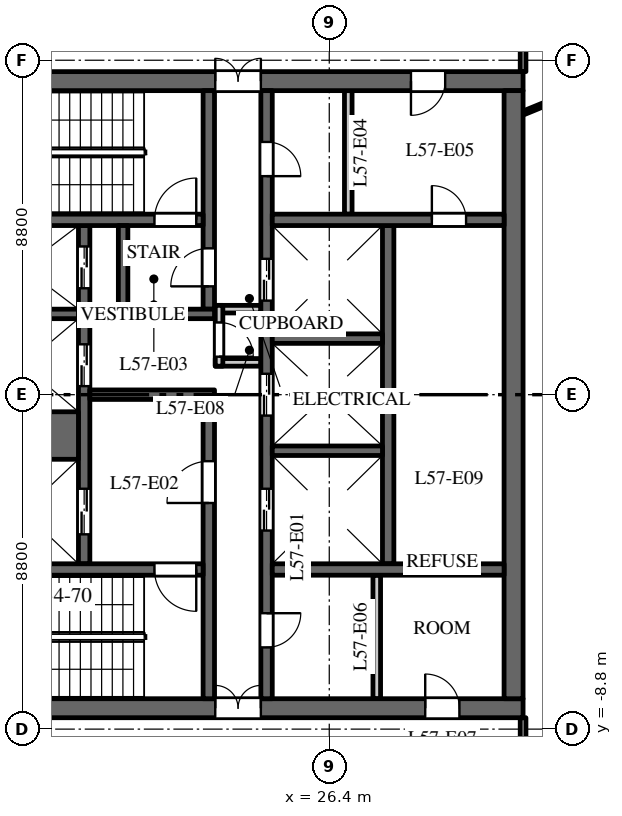
"""IFC4 building model, lengths in metres.
Left out: names, types, materials, properties, quantities, classifications, styles, units other than length and angle.
Written with IfcOpenShell. Run it as: python <this file> out.ifc"""

import sys

from ifc_helpers import new_model, si_unit, direction, frame, frame_2d, origin, place, context, subcontext, project, spatial, rectangle, extrude, element, fill, save


model = new_model("IFC4")
c1 = context("Model", 3, precision=1e-05, world=origin(), true_north=direction((0.0, 1.0)))
c2 = subcontext(c1, "Body", "Model", "MODEL_VIEW")
j1 = project(units=[si_unit("LENGTHUNIT", "METRE"), si_unit("PLANEANGLEUNIT", "RADIAN")], contexts=[c1])
p1 = place(None, origin())
s1 = spatial("IfcSite", under=j1, at=p1, CompositionType="ELEMENT")
p2 = place(p1, origin())
s2 = spatial("IfcBuilding", under=s1, at=p2, CompositionType="ELEMENT")
p3 = place(p2, frame((0.0, 0.0, 269.5)))
s3 = spatial("IfcBuildingStorey", under=s2, at=p3, CompositionType="ELEMENT", Elevation=269.5)
p4 = place(p3, frame((16.5, 8.25, 0.0), z_axis=(0.0, 0.0, 1.0), x_axis=(1.0, 0.0, 0.0)))
e1 = element("IfcWall", 1, at=p4, inside=s3, PredefinedType="SHEAR", context=c2, shape_type="SweptSolid", body=[
    extrude(rectangle(XDim=15.0, YDim=0.5, at=frame_2d((7.5, 0.0))), origin(), (0.0, 0.0, 1.0), 3.7),
])
p5 = place(p4, frame((6.9, 0.0, 0.0)))
e2 = element("IfcOpeningElement", 2, at=p5, cuts=e1, PredefinedType="OPENING", context=c2, shape_type="SweptSolid", body=[
    extrude(rectangle(XDim=1.2, YDim=2.1, at=frame_2d((0.6, 1.05))), frame((0.0, 0.26, 0.0), z_axis=(0.0, -1.0, 0.0), x_axis=(1.0, 0.0, 0.0)), (0.0, 0.0, 1.0), 0.52),
])
p6 = place(p4, frame((12.05, 0.0, 0.0)))
e3 = element("IfcOpeningElement", 3, at=p6, cuts=e1, PredefinedType="OPENING", context=c2, shape_type="SweptSolid", body=[
    extrude(rectangle(XDim=0.9, YDim=2.1, at=frame_2d((0.45, 1.05))), frame((0.0, 0.26, 0.0), z_axis=(0.0, -1.0, 0.0), x_axis=(1.0, 0.0, 0.0)), (0.0, 0.0, 1.0), 0.52),
])
p7 = place(p3, frame((16.5, -8.25, 0.0), z_axis=(0.0, 0.0, 1.0), x_axis=(1.0, 0.0, 0.0)))
e4 = element("IfcWall", 4, at=p7, inside=s3, PredefinedType="SHEAR", context=c2, shape_type="SweptSolid", body=[
    extrude(rectangle(XDim=15.0, YDim=0.5, at=frame_2d((7.5, 0.0))), origin(), (0.0, 0.0, 1.0), 3.7),
])
p8 = place(p7, frame((6.9, 0.0, 0.0)))
e5 = element("IfcOpeningElement", 5, at=p8, cuts=e4, PredefinedType="OPENING", context=c2, shape_type="SweptSolid", body=[
    extrude(rectangle(XDim=1.2, YDim=2.1, at=frame_2d((0.6, 1.05))), frame((0.0, 0.26, 0.0), z_axis=(0.0, -1.0, 0.0), x_axis=(1.0, 0.0, 0.0)), (0.0, 0.0, 1.0), 0.52),
])
p9 = place(p7, frame((12.425, 0.0, 0.0)))
e6 = element("IfcOpeningElement", 6, at=p9, cuts=e4, PredefinedType="OPENING", context=c2, shape_type="SweptSolid", body=[
    extrude(rectangle(XDim=0.9, YDim=2.1, at=frame_2d((0.45, 1.05))), frame((0.0, 0.26, 0.0), z_axis=(0.0, -1.0, 0.0), x_axis=(1.0, 0.0, 0.0)), (0.0, 0.0, 1.0), 0.52),
])
p10 = place(p3, frame((27.95, -4.45, 0.0), z_axis=(0.0, 0.0, 1.0), x_axis=(0.0, 1.0, 0.0)))
e7 = element("IfcWall", 7, at=p10, inside=s3, PredefinedType="SHEAR", context=c2, shape_type="SweptSolid", body=[
    extrude(rectangle(XDim=8.9, YDim=0.3, at=frame_2d((4.45, 0.0))), origin(), (0.0, 0.0, 1.0), 3.7),
])
p11 = place(p3, frame((19.95, -4.45, 0.0), z_axis=(0.0, 0.0, 1.0), x_axis=(0.0, 1.0, 0.0)))
e8 = element("IfcWall", 8, at=p11, inside=s3, PredefinedType="SHEAR", context=c2, shape_type="SweptSolid", body=[
    extrude(rectangle(XDim=8.9, YDim=0.3, at=frame_2d((4.45, 0.0))), origin(), (0.0, 0.0, 1.0), 3.7),
])
p12 = place(p11, frame((0.775, 0.0, 0.0)))
e9 = element("IfcOpeningElement", 9, at=p12, cuts=e8, PredefinedType="OPENING", context=c2, shape_type="SweptSolid", body=[
    extrude(rectangle(XDim=1.2, YDim=2.1, at=frame_2d((0.6, 1.05))), frame((0.0, 0.16, 0.0), z_axis=(0.0, -1.0, 0.0), x_axis=(1.0, 0.0, 0.0)), (0.0, 0.0, 1.0), 0.32),
])
p13 = place(p11, frame((4.675, 0.0, 0.0)))
e10 = element("IfcOpeningElement", 10, at=p13, cuts=e8, PredefinedType="OPENING", context=c2, shape_type="SweptSolid", body=[
    extrude(rectangle(XDim=1.1, YDim=2.1, at=frame_2d((0.55, 1.05))), frame((0.0, 0.16, 0.0), z_axis=(0.0, -1.0, 0.0), x_axis=(1.0, 0.0, 0.0)), (0.0, 0.0, 1.0), 0.32),
])
p14 = place(p11, frame((7.25, 0.0, 0.0)))
e11 = element("IfcOpeningElement", 11, at=p14, cuts=e8, PredefinedType="OPENING", context=c2, shape_type="SweptSolid", body=[
    extrude(rectangle(XDim=1.1, YDim=2.1, at=frame_2d((0.55, 1.05))), frame((0.0, 0.16, 0.0), z_axis=(0.0, -1.0, 0.0), x_axis=(1.0, 0.0, 0.0)), (0.0, 0.0, 1.0), 0.32),
])
p15 = place(p3, frame((24.75, -8.0, 0.0), z_axis=(0.0, 0.0, 1.0), x_axis=(0.0, 1.0, 0.0)))
e12 = element("IfcWall", 12, at=p15, inside=s3, PredefinedType="SHEAR", context=c2, shape_type="SweptSolid", body=[
    extrude(rectangle(XDim=16.0, YDim=0.3, at=frame_2d((8.0, 0.0))), origin(), (0.0, 0.0, 1.0), 3.7),
])
p16 = place(p15, frame((4.425, 0.0, 0.0)))
e13 = element("IfcOpeningElement", 13, at=p16, cuts=e12, PredefinedType="OPENING", context=c2, shape_type="SweptSolid", body=[
    extrude(rectangle(XDim=1.1, YDim=2.1, at=frame_2d((0.55, 1.05))), frame((0.0, 0.16, 0.0), z_axis=(0.0, -1.0, 0.0), x_axis=(1.0, 0.0, 0.0)), (0.0, 0.0, 1.0), 0.32),
])
p17 = place(p15, frame((7.45, 0.0, 0.0)))
e14 = element("IfcOpeningElement", 14, at=p17, cuts=e12, PredefinedType="OPENING", context=c2, shape_type="SweptSolid", body=[
    extrude(rectangle(XDim=1.1, YDim=2.1, at=frame_2d((0.55, 1.05))), frame((0.0, 0.16, 0.0), z_axis=(0.0, -1.0, 0.0), x_axis=(1.0, 0.0, 0.0)), (0.0, 0.0, 1.0), 0.32),
])
p18 = place(p15, frame((10.475, 0.0, 0.0)))
e15 = element("IfcOpeningElement", 15, at=p18, cuts=e12, PredefinedType="OPENING", context=c2, shape_type="SweptSolid", body=[
    extrude(rectangle(XDim=1.1, YDim=2.1, at=frame_2d((0.55, 1.05))), frame((0.0, 0.16, 0.0), z_axis=(0.0, -1.0, 0.0), x_axis=(1.0, 0.0, 0.0)), (0.0, 0.0, 1.0), 0.32),
])
p19 = place(p15, frame((13.75, 0.0, 0.0)))
e16 = element("IfcOpeningElement", 16, at=p19, cuts=e12, PredefinedType="OPENING", context=c2, shape_type="SweptSolid", body=[
    extrude(rectangle(XDim=0.9, YDim=2.1, at=frame_2d((0.45, 1.05))), frame((0.0, 0.16, 0.0), z_axis=(0.0, -1.0, 0.0), x_axis=(1.0, 0.0, 0.0)), (0.0, 0.0, 1.0), 0.32),
])
p20 = place(p15, frame((1.35, 0.0, 0.0)))
e17 = element("IfcOpeningElement", 17, at=p20, cuts=e12, PredefinedType="OPENING", context=c2, shape_type="SweptSolid", body=[
    extrude(rectangle(XDim=0.9, YDim=2.1, at=frame_2d((0.45, 1.05))), frame((0.0, 0.16, 0.0), z_axis=(0.0, -1.0, 0.0), x_axis=(1.0, 0.0, 0.0)), (0.0, 0.0, 1.0), 0.32),
])
p21 = place(p3, frame((20.1, 0.0, 0.0), z_axis=(0.0, 0.0, 1.0), x_axis=(1.0, 0.0, 0.0)))
e18 = element("IfcWall", 18, at=p21, inside=s3, PredefinedType="SHEAR", context=c2, shape_type="SweptSolid", body=[
    extrude(rectangle(XDim=3.28, YDim=0.25, at=frame_2d((1.64, 0.0))), origin(), (0.0, 0.0, 1.0), 3.7),
])
for number, where, z_axis, x_axis in (
    (19, (23.4, 0.85, 0.0), (0.0, 0.0, 1.0), (1.0, 0.0, 0.0)),
    (20, (23.4, 2.25, 0.0), (0.0, 0.0, 1.0), (1.0, 0.0, 0.0)),
):
    element("IfcWall", number, at=place(p3, frame(where, z_axis=z_axis, x_axis=x_axis)), inside=s3, PredefinedType="PARTITIONING", context=c2, shape_type="SweptSolid", body=[
        extrude(rectangle(XDim=1.2, YDim=0.2, at=frame_2d((0.6, 0.0))), origin(), (0.0, 0.0, 1.0), 3.7),
    ])
p22 = place(p3, frame((23.5, 0.75, 0.0), z_axis=(0.0, 0.0, 1.0), x_axis=(0.0, 1.0, 0.0)))
e21 = element("IfcWall", 21, at=p22, inside=s3, PredefinedType="PARTITIONING", context=c2, shape_type="SweptSolid", body=[
    extrude(rectangle(XDim=1.6, YDim=0.2, at=frame_2d((0.8, 0.0))), origin(), (0.0, 0.0, 1.0), 3.7),
])
p23 = place(p22, frame((0.25, 0.0, 0.0)))
e22 = element("IfcOpeningElement", 22, at=p23, cuts=e21, PredefinedType="OPENING", context=c2, shape_type="SweptSolid", body=[
    extrude(rectangle(XDim=0.9, YDim=2.1, at=frame_2d((0.45, 1.05))), frame((0.0, 0.11, 0.0), z_axis=(0.0, -1.0, 0.0), x_axis=(1.0, 0.0, 0.0)), (0.0, 0.0, 1.0), 0.22),
])
p24 = place(p3, frame((31.25, -8.0, 0.0), z_axis=(0.0, 0.0, 1.0), x_axis=(0.0, 1.0, 0.0)))
e23 = element("IfcWall", 23, at=p24, inside=s3, PredefinedType="SHEAR", context=c2, shape_type="SweptSolid", body=[
    extrude(rectangle(XDim=16.0, YDim=0.5, at=frame_2d((8.0, 0.0))), origin(), (0.0, 0.0, 1.0), 3.7),
])
p25 = place(p3, frame((24.9, 4.6, 0.0), z_axis=(0.0, 0.0, 1.0), x_axis=(1.0, 0.0, 0.0)))
e24 = element("IfcWall", 24, at=p25, inside=s3, PredefinedType="SHEAR", context=c2, shape_type="SweptSolid", body=[
    extrude(rectangle(XDim=6.1, YDim=0.3, at=frame_2d((3.05, 0.0))), origin(), (0.0, 0.0, 1.0), 3.7),
])
p26 = place(p25, frame((4.2, 0.0, 0.0)))
e25 = element("IfcOpeningElement", 25, at=p26, cuts=e24, PredefinedType="OPENING", context=c2, shape_type="SweptSolid", body=[
    extrude(rectangle(XDim=0.9, YDim=2.1, at=frame_2d((0.45, 1.05))), frame((0.0, 0.16, 0.0), z_axis=(0.0, -1.0, 0.0), x_axis=(1.0, 0.0, 0.0)), (0.0, 0.0, 1.0), 0.32),
])
for number, where, z_axis, x_axis in (
    (26, (26.9, 4.75, 0.0), (0.0, 0.0, 1.0), (0.0, 1.0, 0.0)),
    (27, (27.65, -8.0, 0.0), (0.0, 0.0, 1.0), (0.0, 1.0, 0.0)),
):
    element("IfcWall", number, at=place(p3, frame(where, z_axis=z_axis, x_axis=x_axis)), inside=s3, PredefinedType="PARTITIONING", context=c2, shape_type="SweptSolid", body=[
        extrude(rectangle(XDim=3.25, YDim=0.2, at=frame_2d((1.625, 0.0))), origin(), (0.0, 0.0, 1.0), 3.7),
    ])
p27 = place(p3, frame((24.9, -4.6, 0.0), z_axis=(0.0, 0.0, 1.0), x_axis=(1.0, 0.0, 0.0)))
e28 = element("IfcWall", 28, at=p27, inside=s3, PredefinedType="SHEAR", context=c2, shape_type="SweptSolid", body=[
    extrude(rectangle(XDim=6.1, YDim=0.3, at=frame_2d((3.05, 0.0))), origin(), (0.0, 0.0, 1.0), 3.7),
])
p28 = place(p3, frame((16.9, -1.075, 0.0), z_axis=(0.0, 0.0, 1.0), x_axis=(1.0, 0.0, 0.0)))
e29 = element("IfcWall", 29, at=p28, inside=s3, PredefinedType="SHEAR", context=c2, shape_type="SweptSolid", body=[
    extrude(rectangle(XDim=2.9, YDim=1.25, at=frame_2d((1.45, 0.0))), origin(), (0.0, 0.0, 1.0), 3.7),
])
for number, where, z_axis, x_axis in (
    (30, (16.9, 2.125, 0.0), (0.0, 0.0, 1.0), (1.0, 0.0, 0.0)),
    (31, (24.9, -1.475, 0.0), (0.0, 0.0, 1.0), (1.0, 0.0, 0.0)),
    (32, (24.9, 1.475, 0.0), (0.0, 0.0, 1.0), (1.0, 0.0, 0.0)),
):
    element("IfcWall", number, at=place(p3, frame(where, z_axis=z_axis, x_axis=x_axis)), inside=s3, PredefinedType="SHEAR", context=c2, shape_type="SweptSolid", body=[
        extrude(rectangle(XDim=2.9, YDim=0.25, at=frame_2d((1.45, 0.0))), origin(), (0.0, 0.0, 1.0), 3.7),
    ])
p29 = place(p3, frame((23.23, 2.25, 0.0), z_axis=(0.0, 0.0, 1.0), x_axis=(0.0, 1.0, 0.0)))
e33 = element("IfcWall", 33, at=p29, inside=s3, PredefinedType="SHEAR", context=c2, shape_type="SweptSolid", body=[
    extrude(rectangle(XDim=5.75, YDim=0.3, at=frame_2d((2.875, 0.0))), origin(), (0.0, 0.0, 1.0), 3.7),
])
p30 = place(p29, frame((0.6, 0.0, 0.0)))
e34 = element("IfcOpeningElement", 34, at=p30, cuts=e33, PredefinedType="OPENING", context=c2, shape_type="SweptSolid", body=[
    extrude(rectangle(XDim=1.0, YDim=2.1, at=frame_2d((0.5, 1.05))), frame((0.0, 0.16, 0.0), z_axis=(0.0, -1.0, 0.0), x_axis=(1.0, 0.0, 0.0)), (0.0, 0.0, 1.0), 0.32),
])
p31 = place(p3, frame((23.23, -8.0, 0.0), z_axis=(0.0, 0.0, 1.0), x_axis=(0.0, 1.0, 0.0)))
e35 = element("IfcWall", 35, at=p31, inside=s3, PredefinedType="SHEAR", context=c2, shape_type="SweptSolid", body=[
    extrude(rectangle(XDim=7.875, YDim=0.3, at=frame_2d((3.938, 0.0))), origin(), (0.0, 0.0, 1.0), 3.7),
])
p32 = place(p31, frame((5.15, 0.0, 0.0)))
e36 = element("IfcOpeningElement", 36, at=p32, cuts=e35, PredefinedType="OPENING", context=c2, shape_type="SweptSolid", body=[
    extrude(rectangle(XDim=1.1, YDim=2.1, at=frame_2d((0.55, 1.05))), frame((0.0, 0.16, 0.0), z_axis=(0.0, -1.0, 0.0), x_axis=(1.0, 0.0, 0.0)), (0.0, 0.0, 1.0), 0.32),
])
p33 = place(p3, frame((16.9, 4.6, 0.0), z_axis=(0.0, 0.0, 1.0), x_axis=(1.0, 0.0, 0.0)))
e37 = element("IfcWall", 37, at=p33, inside=s3, PredefinedType="SHEAR", context=c2, shape_type="SweptSolid", body=[
    extrude(rectangle(XDim=6.18, YDim=0.3, at=frame_2d((3.09, 0.0))), origin(), (0.0, 0.0, 1.0), 3.7),
])
p34 = place(p33, frame((4.9, 0.0, 0.0)))
e38 = element("IfcOpeningElement", 38, at=p34, cuts=e37, PredefinedType="OPENING", context=c2, shape_type="SweptSolid", body=[
    extrude(rectangle(XDim=1.1, YDim=2.1, at=frame_2d((0.55, 1.05))), frame((0.0, 0.16, 0.0), z_axis=(0.0, -1.0, 0.0), x_axis=(1.0, 0.0, 0.0)), (0.0, 0.0, 1.0), 0.32),
])
p35 = place(p3, frame((16.9, -4.6, 0.0), z_axis=(0.0, 0.0, 1.0), x_axis=(1.0, 0.0, 0.0)))
e39 = element("IfcWall", 39, at=p35, inside=s3, PredefinedType="SHEAR", context=c2, shape_type="SweptSolid", body=[
    extrude(rectangle(XDim=6.18, YDim=0.3, at=frame_2d((3.09, 0.0))), origin(), (0.0, 0.0, 1.0), 3.7),
])
p36 = place(p35, frame((4.9, 0.0, 0.0)))
e40 = element("IfcOpeningElement", 40, at=p36, cuts=e39, PredefinedType="OPENING", context=c2, shape_type="SweptSolid", body=[
    extrude(rectangle(XDim=1.1, YDim=2.1, at=frame_2d((0.55, 1.05))), frame((0.0, 0.16, 0.0), z_axis=(0.0, -1.0, 0.0), x_axis=(1.0, 0.0, 0.0)), (0.0, 0.0, 1.0), 0.32),
])
p37 = place(p3, frame((20.85, 2.125, 0.0), z_axis=(0.0, 0.0, 1.0), x_axis=(1.0, 0.0, 0.0)))
e41 = element("IfcWall", 41, at=p37, inside=s3, PredefinedType="SHEAR", context=c2, shape_type="SweptSolid", body=[
    extrude(rectangle(XDim=2.53, YDim=0.25, at=frame_2d((1.265, 0.0))), origin(), (0.0, 0.0, 1.0), 3.7),
])
p38 = place(p3, frame((20.975, 2.25, 0.0), z_axis=(0.0, 0.0, 1.0), x_axis=(0.0, 1.0, 0.0)))
e42 = element("IfcWall", 42, at=p38, inside=s3, PredefinedType="SHEAR", context=c2, shape_type="SweptSolid", body=[
    extrude(rectangle(XDim=2.2, YDim=0.25, at=frame_2d((1.1, 0.0))), origin(), (0.0, 0.0, 1.0), 3.7),
])
p39 = place(p3, frame((31.5, -10.7, 0.0), z_axis=(0.0, 0.0, 1.0), x_axis=(0.0, 1.0, 0.0)))
e43 = element("IfcWall", 43, at=p39, inside=s3, PredefinedType="PARTITIONING", context=c2, shape_type="SweptSolid", body=[
    extrude(rectangle(XDim=2.2, YDim=0.15, at=frame_2d((1.1, 0.0))), origin(), (0.0, 0.0, 1.0), 3.0),
])
p40 = place(p3, frame((31.5, 7.41, 0.0), z_axis=(0.0, 0.0, 1.0), x_axis=(0.925344112436, 0.379128307542, 0.0)))
e44 = element("IfcWall", 44, at=p40, inside=s3, PredefinedType="PARTITIONING", context=c2, shape_type="SweptSolid", body=[
    extrude(rectangle(XDim=2.954, YDim=0.1, at=frame_2d((1.477, 0.0))), origin(), (0.0, 0.0, 1.0), 3.2),
])
p41 = place(p3, frame((31.5, 8.5, 0.0), z_axis=(0.0, 0.0, 1.0), x_axis=(0.0, 1.0, 0.0)))
e45 = element("IfcWall", 45, at=p41, inside=s3, PredefinedType="PARTITIONING", context=c2, shape_type="SweptSolid", body=[
    extrude(rectangle(XDim=2.2, YDim=0.15, at=frame_2d((1.1, 0.0))), origin(), (0.0, 0.0, 1.0), 3.0),
])
p42 = place(p12, origin())
e46 = element("IfcDoor", 46, at=p42, inside=s3, OperationType="DOUBLE_DOOR_SLIDING", PredefinedType="DOOR", context=c2, shape_type="SweptSolid", body=[
    extrude(rectangle(XDim=1.2, YDim=2.1, at=frame_2d((0.6, 1.05))), frame((0.0, 0.025, 0.0), z_axis=(0.0, -1.0, 0.0), x_axis=(1.0, 0.0, 0.0)), (0.0, 0.0, 1.0), 0.05),
])
fill(e9, e46)
p43 = place(p13, origin())
e47 = element("IfcDoor", 47, at=p43, inside=s3, OperationType="DOUBLE_DOOR_SLIDING", PredefinedType="DOOR", context=c2, shape_type="SweptSolid", body=[
    extrude(rectangle(XDim=1.1, YDim=2.1, at=frame_2d((0.55, 1.05))), frame((0.0, 0.025, 0.0), z_axis=(0.0, -1.0, 0.0), x_axis=(1.0, 0.0, 0.0)), (0.0, 0.0, 1.0), 0.05),
])
fill(e10, e47)
p44 = place(p14, origin())
e48 = element("IfcDoor", 48, at=p44, inside=s3, OperationType="DOUBLE_DOOR_SLIDING", PredefinedType="DOOR", context=c2, shape_type="SweptSolid", body=[
    extrude(rectangle(XDim=1.1, YDim=2.1, at=frame_2d((0.55, 1.05))), frame((0.0, 0.025, 0.0), z_axis=(0.0, -1.0, 0.0), x_axis=(1.0, 0.0, 0.0)), (0.0, 0.0, 1.0), 0.05),
])
fill(e11, e48)
p45 = place(p16, origin())
e49 = element("IfcDoor", 49, at=p45, inside=s3, OperationType="DOUBLE_DOOR_SLIDING", PredefinedType="DOOR", context=c2, shape_type="SweptSolid", body=[
    extrude(rectangle(XDim=1.1, YDim=2.1, at=frame_2d((0.55, 1.05))), frame((0.0, 0.025, 0.0), z_axis=(0.0, -1.0, 0.0), x_axis=(1.0, 0.0, 0.0)), (0.0, 0.0, 1.0), 0.05),
])
fill(e13, e49)
p46 = place(p17, origin())
e50 = element("IfcDoor", 50, at=p46, inside=s3, OperationType="DOUBLE_DOOR_SLIDING", PredefinedType="DOOR", context=c2, shape_type="SweptSolid", body=[
    extrude(rectangle(XDim=1.1, YDim=2.1, at=frame_2d((0.55, 1.05))), frame((0.0, 0.025, 0.0), z_axis=(0.0, -1.0, 0.0), x_axis=(1.0, 0.0, 0.0)), (0.0, 0.0, 1.0), 0.05),
])
fill(e14, e50)
p47 = place(p18, origin())
e51 = element("IfcDoor", 51, at=p47, inside=s3, OperationType="DOUBLE_DOOR_SLIDING", PredefinedType="DOOR", context=c2, shape_type="SweptSolid", body=[
    extrude(rectangle(XDim=1.1, YDim=2.1, at=frame_2d((0.55, 1.05))), frame((0.0, 0.025, 0.0), z_axis=(0.0, -1.0, 0.0), x_axis=(1.0, 0.0, 0.0)), (0.0, 0.0, 1.0), 0.05),
])
fill(e15, e51)
p48 = place(p34, origin())
e52 = element("IfcDoor", 52, at=p48, inside=s3, OperationType="SINGLE_SWING_LEFT", PredefinedType="DOOR", context=c2, shape_type="SweptSolid", body=[
    extrude(rectangle(XDim=1.1, YDim=2.1, at=frame_2d((0.55, 1.05))), frame((0.0, 0.025, 0.0), z_axis=(0.0, -1.0, 0.0), x_axis=(1.0, 0.0, 0.0)), (0.0, 0.0, 1.0), 0.05),
])
fill(e38, e52)
p49 = place(p36, origin())
e53 = element("IfcDoor", 53, at=p49, inside=s3, OperationType="SINGLE_SWING_RIGHT", PredefinedType="DOOR", context=c2, shape_type="SweptSolid", body=[
    extrude(rectangle(XDim=1.1, YDim=2.1, at=frame_2d((0.55, 1.05))), frame((0.0, 0.025, 0.0), z_axis=(0.0, -1.0, 0.0), x_axis=(1.0, 0.0, 0.0)), (0.0, 0.0, 1.0), 0.05),
])
fill(e40, e53)
p50 = place(p32, origin())
e54 = element("IfcDoor", 54, at=p50, inside=s3, OperationType="SINGLE_SWING_RIGHT", PredefinedType="DOOR", context=c2, shape_type="SweptSolid", body=[
    extrude(rectangle(XDim=1.1, YDim=2.1, at=frame_2d((0.55, 1.05))), frame((0.0, 0.025, 0.0), z_axis=(0.0, -1.0, 0.0), x_axis=(1.0, 0.0, 0.0)), (0.0, 0.0, 1.0), 0.05),
])
fill(e36, e54)
p51 = place(p30, origin())
e55 = element("IfcDoor", 55, at=p51, inside=s3, OperationType="SINGLE_SWING_RIGHT", PredefinedType="DOOR", context=c2, shape_type="SweptSolid", body=[
    extrude(rectangle(XDim=1.0, YDim=2.1, at=frame_2d((0.5, 1.05))), frame((0.0, 0.025, 0.0), z_axis=(0.0, -1.0, 0.0), x_axis=(1.0, 0.0, 0.0)), (0.0, 0.0, 1.0), 0.05),
])
fill(e34, e55)
p52 = place(p5, origin())
e56 = element("IfcDoor", 56, at=p52, inside=s3, OperationType="DOUBLE_DOOR_DOUBLE_SWING", PredefinedType="DOOR", context=c2, shape_type="SweptSolid", body=[
    extrude(rectangle(XDim=1.2, YDim=2.1, at=frame_2d((0.6, 1.05))), frame((0.0, 0.025, 0.0), z_axis=(0.0, -1.0, 0.0), x_axis=(1.0, 0.0, 0.0)), (0.0, 0.0, 1.0), 0.05),
])
fill(e2, e56)
p53 = place(p8, origin())
e57 = element("IfcDoor", 57, at=p53, inside=s3, OperationType="DOUBLE_DOOR_DOUBLE_SWING", PredefinedType="DOOR", context=c2, shape_type="SweptSolid", body=[
    extrude(rectangle(XDim=1.2, YDim=2.1, at=frame_2d((0.6, 1.05))), frame((0.0, 0.025, 0.0), z_axis=(0.0, -1.0, 0.0), x_axis=(1.0, 0.0, 0.0)), (0.0, 0.0, 1.0), 0.05),
])
fill(e5, e57)
p54 = place(p19, origin())
e58 = element("IfcDoor", 58, at=p54, inside=s3, OperationType="SINGLE_SWING_LEFT", PredefinedType="DOOR", context=c2, shape_type="SweptSolid", body=[
    extrude(rectangle(XDim=0.9, YDim=2.1, at=frame_2d((0.45, 1.05))), frame((0.0, 0.025, 0.0), z_axis=(0.0, -1.0, 0.0), x_axis=(1.0, 0.0, 0.0)), (0.0, 0.0, 1.0), 0.05),
])
fill(e16, e58)
p55 = place(p6, origin())
e59 = element("IfcDoor", 59, at=p55, inside=s3, OperationType="SINGLE_SWING_LEFT", PredefinedType="DOOR", context=c2, shape_type="SweptSolid", body=[
    extrude(rectangle(XDim=0.9, YDim=2.1, at=frame_2d((0.45, 1.05))), frame((0.0, 0.025, 0.0), z_axis=(0.0, -1.0, 0.0), x_axis=(1.0, 0.0, 0.0)), (0.0, 0.0, 1.0), 0.05),
])
fill(e3, e59)
p56 = place(p20, origin())
e60 = element("IfcDoor", 60, at=p56, inside=s3, OperationType="SINGLE_SWING_RIGHT", PredefinedType="DOOR", context=c2, shape_type="SweptSolid", body=[
    extrude(rectangle(XDim=0.9, YDim=2.1, at=frame_2d((0.45, 1.05))), frame((0.0, 0.025, 0.0), z_axis=(0.0, -1.0, 0.0), x_axis=(1.0, 0.0, 0.0)), (0.0, 0.0, 1.0), 0.05),
])
fill(e17, e60)
p57 = place(p9, origin())
e61 = element("IfcDoor", 61, at=p57, inside=s3, OperationType="SINGLE_SWING_RIGHT", PredefinedType="DOOR", context=c2, shape_type="SweptSolid", body=[
    extrude(rectangle(XDim=0.9, YDim=2.1, at=frame_2d((0.45, 1.05))), frame((0.0, 0.025, 0.0), z_axis=(0.0, -1.0, 0.0), x_axis=(1.0, 0.0, 0.0)), (0.0, 0.0, 1.0), 0.05),
])
fill(e6, e61)
p58 = place(p23, origin())
e62 = element("IfcDoor", 62, at=p58, inside=s3, OperationType="SINGLE_SWING_LEFT", PredefinedType="DOOR", context=c2, shape_type="SweptSolid", body=[
    extrude(rectangle(XDim=0.9, YDim=2.1, at=frame_2d((0.45, 1.05))), frame((0.0, 0.025, 0.0), z_axis=(0.0, -1.0, 0.0), x_axis=(1.0, 0.0, 0.0)), (0.0, 0.0, 1.0), 0.05),
])
fill(e22, e62)
p59 = place(p26, origin())
e63 = element("IfcDoor", 63, at=p59, inside=s3, OperationType="SINGLE_SWING_RIGHT", PredefinedType="DOOR", context=c2, shape_type="SweptSolid", body=[
    extrude(rectangle(XDim=0.9, YDim=2.1, at=frame_2d((0.45, 1.05))), frame((0.0, 0.025, 0.0), z_axis=(0.0, -1.0, 0.0), x_axis=(1.0, 0.0, 0.0)), (0.0, 0.0, 1.0), 0.05),
])
fill(e25, e63)
save(model, sys.argv[1])
